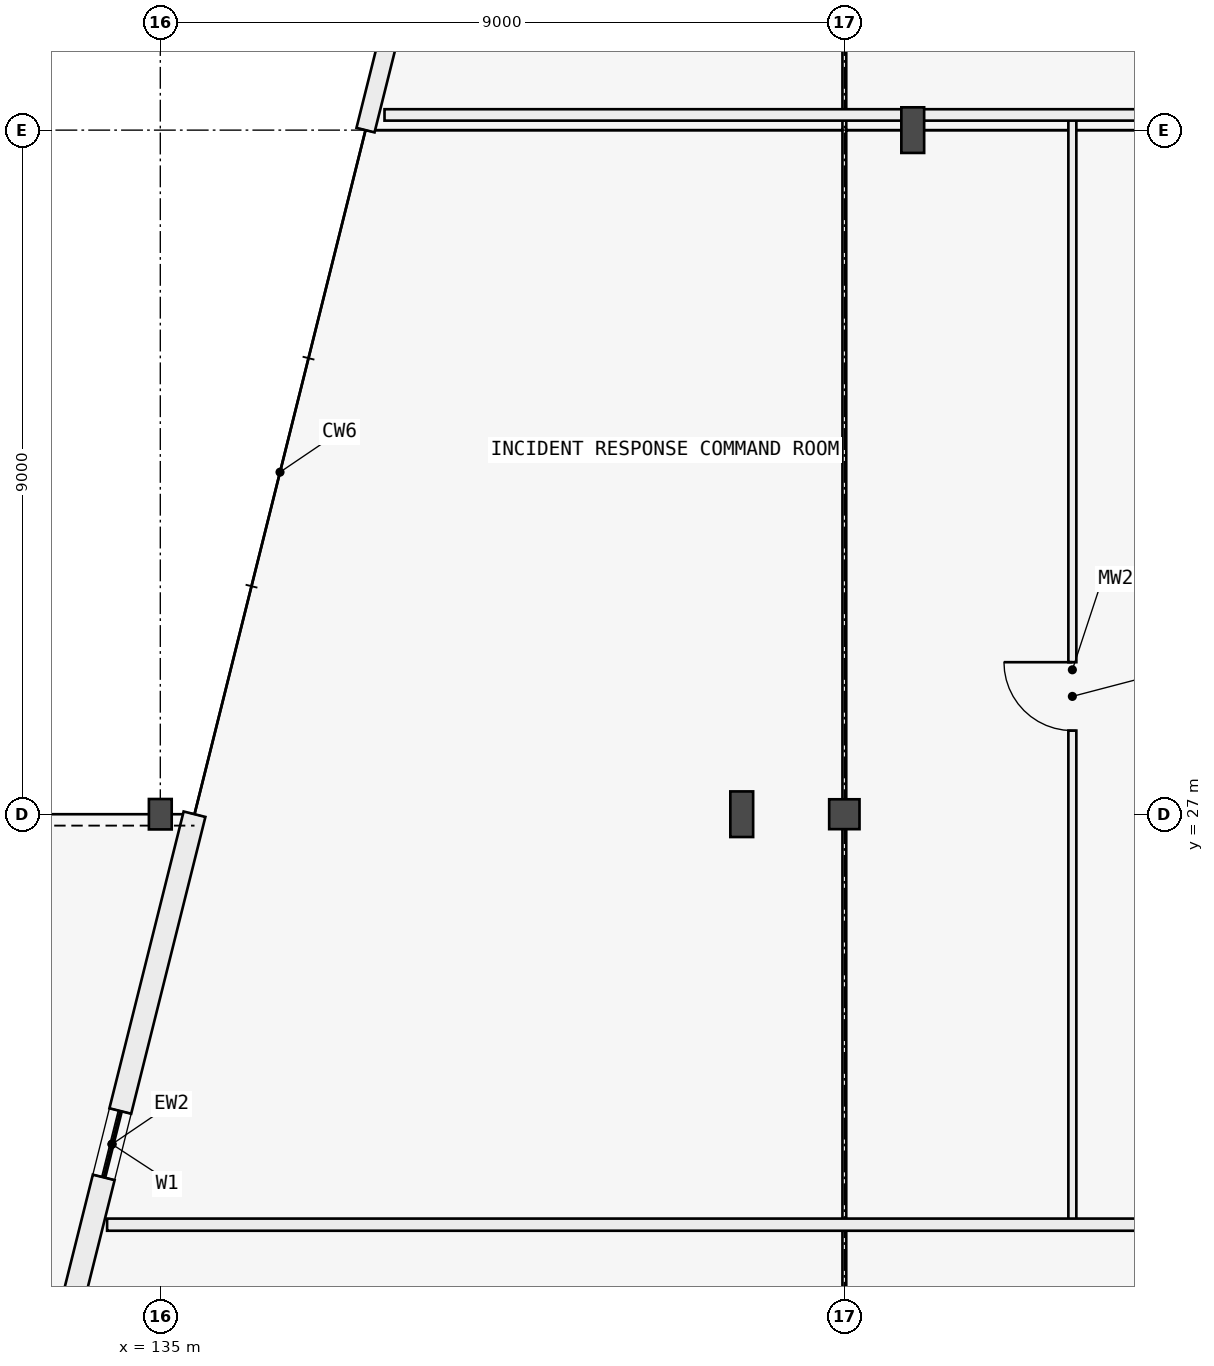
"""IFC4 building model, lengths in metres.
Left out: names, types, materials, properties, quantities, classifications, styles, units other than length and angle.
Written with IfcOpenShell. Run it as: python <this file> out.ifc"""

import sys

from ifc_helpers import new_model, si_unit, direction, frame, frame_2d, origin, origin_2d, place, context, subcontext, project, spatial, rectangle, i_section, extrude, element, fill, save


model = new_model("IFC4")
c1 = context("Model", 3, precision=1e-05, world=origin(), true_north=direction((0.0, 1.0)))
c2 = subcontext(c1, "Body", "Model", "MODEL_VIEW")
j1 = project(units=[si_unit("LENGTHUNIT", "METRE"), si_unit("PLANEANGLEUNIT", "RADIAN")], contexts=[c1])
p1 = place(None, origin())
s1 = spatial("IfcSite", under=j1, at=p1, CompositionType="ELEMENT")
p2 = place(p1, origin())
s2 = spatial("IfcBuilding", under=s1, at=p2, CompositionType="ELEMENT")
p3 = place(p2, frame((0.0, 0.0, 21.0)))
s3 = spatial("IfcBuildingStorey", under=s2, at=p3, CompositionType="ELEMENT", Elevation=21.0)
p4 = place(p3, frame((135.0, 27.0, 0.0), z_axis=(0.0, 0.0, 1.0), x_axis=(1.0, 0.0, 0.0)))
e1 = element("IfcColumn", 1, at=p4, inside=s3, PredefinedType="COLUMN", context=c2, shape_type="SweptSolid", body=[
    extrude(i_section(OverallWidth=0.3, OverallDepth=0.4, WebThickness=0.013, FlangeThickness=0.024, FilletRadius=0.027, at=origin_2d()), origin(), (0.0, 0.0, 1.0), 4.2),
])
p5 = place(p3, frame((142.65, 27.0, 0.0), z_axis=(0.0, 0.0, 1.0), x_axis=(1.0, 0.0, 0.0)))
e2 = element("IfcColumn", 2, at=p5, inside=s3, PredefinedType="COLUMN", context=c2, shape_type="SweptSolid", body=[
    extrude(i_section(OverallWidth=0.3, OverallDepth=0.6, WebThickness=0.015, FlangeThickness=0.03, FilletRadius=0.027, at=origin_2d()), origin(), (0.0, 0.0, 1.0), 4.2),
])
p6 = place(p3, frame((144.0, 27.0, 0.0), z_axis=(0.0, 0.0, 1.0), x_axis=(1.0, 0.0, 0.0)))
e3 = element("IfcColumn", 3, at=p6, inside=s3, PredefinedType="COLUMN", context=c2, shape_type="SweptSolid", body=[
    extrude(i_section(OverallWidth=0.399, OverallDepth=0.393, WebThickness=0.018, FlangeThickness=0.028, FilletRadius=0.015, at=origin_2d()), origin(), (0.0, 0.0, 1.0), 4.2),
])
p7 = place(p3, frame((144.9, 36.0, 0.0), z_axis=(0.0, 0.0, 1.0), x_axis=(1.0, 0.0, 0.0)))
e4 = element("IfcColumn", 4, at=p7, inside=s3, PredefinedType="COLUMN", context=c2, shape_type="SweptSolid", body=[
    extrude(i_section(OverallWidth=0.3, OverallDepth=0.6, WebThickness=0.015, FlangeThickness=0.03, FilletRadius=0.027, at=origin_2d()), origin(), (0.0, 0.0, 1.0), 4.2),
])
p8 = place(p3, frame((133.279, 18.318, 0.0), z_axis=(0.0, 0.0, 1.0), x_axis=(0.242542043737, 0.970140895448, 0.0)))
e5 = element("IfcWall", 5, at=p8, inside=s3, PredefinedType="STANDARD", context=c2, shape_type="SweptSolid", body=[
    extrude(rectangle(XDim=8.95, YDim=0.295, at=frame_2d((4.475, 0.0))), origin(), (0.0, 0.0, 1.0), 3.485),
])
p9 = place(p8, frame((4.025, 0.0, 0.95)))
e6 = element("IfcOpeningElement", 6, at=p9, cuts=e5, PredefinedType="OPENING", context=c2, shape_type="SweptSolid", body=[
    extrude(rectangle(XDim=0.9, YDim=1.2, at=frame_2d((0.45, 0.6))), frame((0.0, 0.157, 0.0), z_axis=(0.0, -1.0, 0.0), x_axis=(1.0, 0.0, 0.0)), (0.0, 0.0, 1.0), 0.315),
])
p10 = place(p3, frame((137.7, 36.0, 0.0), z_axis=(0.0, 0.0, 1.0), x_axis=(0.242535625036, 0.970142500145, 0.0)))
e7 = element("IfcWall", 7, at=p10, inside=s3, PredefinedType="STANDARD", context=c2, shape_type="SweptSolid", body=[
    extrude(rectangle(XDim=9.277, YDim=0.245, at=frame_2d((4.639, 0.0))), origin(), (0.0, 0.0, 1.0), 3.96),
])
p11 = place(p10, frame((4.039, 0.0, 0.95)))
e8 = element("IfcOpeningElement", 8, at=p11, cuts=e7, PredefinedType="OPENING", context=c2, shape_type="SweptSolid", body=[
    extrude(rectangle(XDim=1.2, YDim=1.35, at=frame_2d((0.6, 0.675))), frame((0.0, 0.133, 0.0), z_axis=(0.0, -1.0, 0.0), x_axis=(1.0, 0.0, 0.0)), (0.0, 0.0, 1.0), 0.265),
])
p12 = place(p3, frame((147.0, 21.6, 0.0), z_axis=(0.0, 0.0, 1.0), x_axis=(0.0, 1.0, 0.0)))
e9 = element("IfcWall", 9, at=p12, inside=s3, PredefinedType="MOVABLE", context=c2, shape_type="SweptSolid", body=[
    extrude(rectangle(XDim=14.6, YDim=0.105, at=frame_2d((7.3, 0.0))), origin(), (0.0, 0.0, 1.0), 3.96),
])
p13 = place(p12, frame((6.5, 0.0, 0.0)))
e10 = element("IfcOpeningElement", 10, at=p13, cuts=e9, PredefinedType="OPENING", context=c2, shape_type="SweptSolid", body=[
    extrude(rectangle(XDim=0.9, YDim=2.1, at=frame_2d((0.45, 1.05))), frame((0.0, 0.062, 0.0), z_axis=(0.0, -1.0, 0.0), x_axis=(1.0, 0.0, 0.0)), (0.0, 0.0, 1.0), 0.125),
])
p14 = place(p3, frame((134.3, 21.6, 0.0), z_axis=(0.0, 0.0, 1.0), x_axis=(1.0, 0.0, 0.0)))
e11 = element("IfcWall", 11, at=p14, inside=s3, PredefinedType="PARTITIONING", context=c2, shape_type="SweptSolid", body=[
    extrude(rectangle(XDim=15.9, YDim=0.16, at=frame_2d((7.95, 0.0))), origin(), (0.0, 0.0, 1.0), 3.96),
])
p15 = place(p3, frame((137.95, 36.2, 0.0), z_axis=(0.0, 0.0, 1.0), x_axis=(1.0, 0.0, 0.0)))
e12 = element("IfcWall", 12, at=p15, inside=s3, PredefinedType="PARTITIONING", context=c2, shape_type="SweptSolid", body=[
    extrude(rectangle(XDim=20.65, YDim=0.15, at=frame_2d((10.325, 0.0))), origin(), (0.0, 0.0, 1.0), 3.435),
])
p16 = place(p9, origin())
e13 = element("IfcWindow", 13, at=p16, inside=s3, PartitioningType="SINGLE_PANEL", PredefinedType="WINDOW", context=c2, shape_type="SweptSolid", body=[
    extrude(rectangle(XDim=0.9, YDim=1.2, at=frame_2d((0.45, 0.6))), frame((0.0, 0.03, 0.0), z_axis=(0.0, -1.0, 0.0), x_axis=(1.0, 0.0, 0.0)), (0.0, 0.0, 1.0), 0.06),
])
fill(e6, e13)
p17 = place(p13, origin())
e14 = element("IfcDoor", 14, at=p17, inside=s3, OperationType="SINGLE_SWING_RIGHT", PredefinedType="DOOR", context=c2, shape_type="SweptSolid", body=[
    extrude(rectangle(XDim=0.9, YDim=2.1, at=frame_2d((0.45, 1.05))), frame((0.0, 0.025, 0.0), z_axis=(0.0, -1.0, 0.0), x_axis=(1.0, 0.0, 0.0)), (0.0, 0.0, 1.0), 0.05),
])
fill(e10, e14)
save(model, sys.argv[1])
